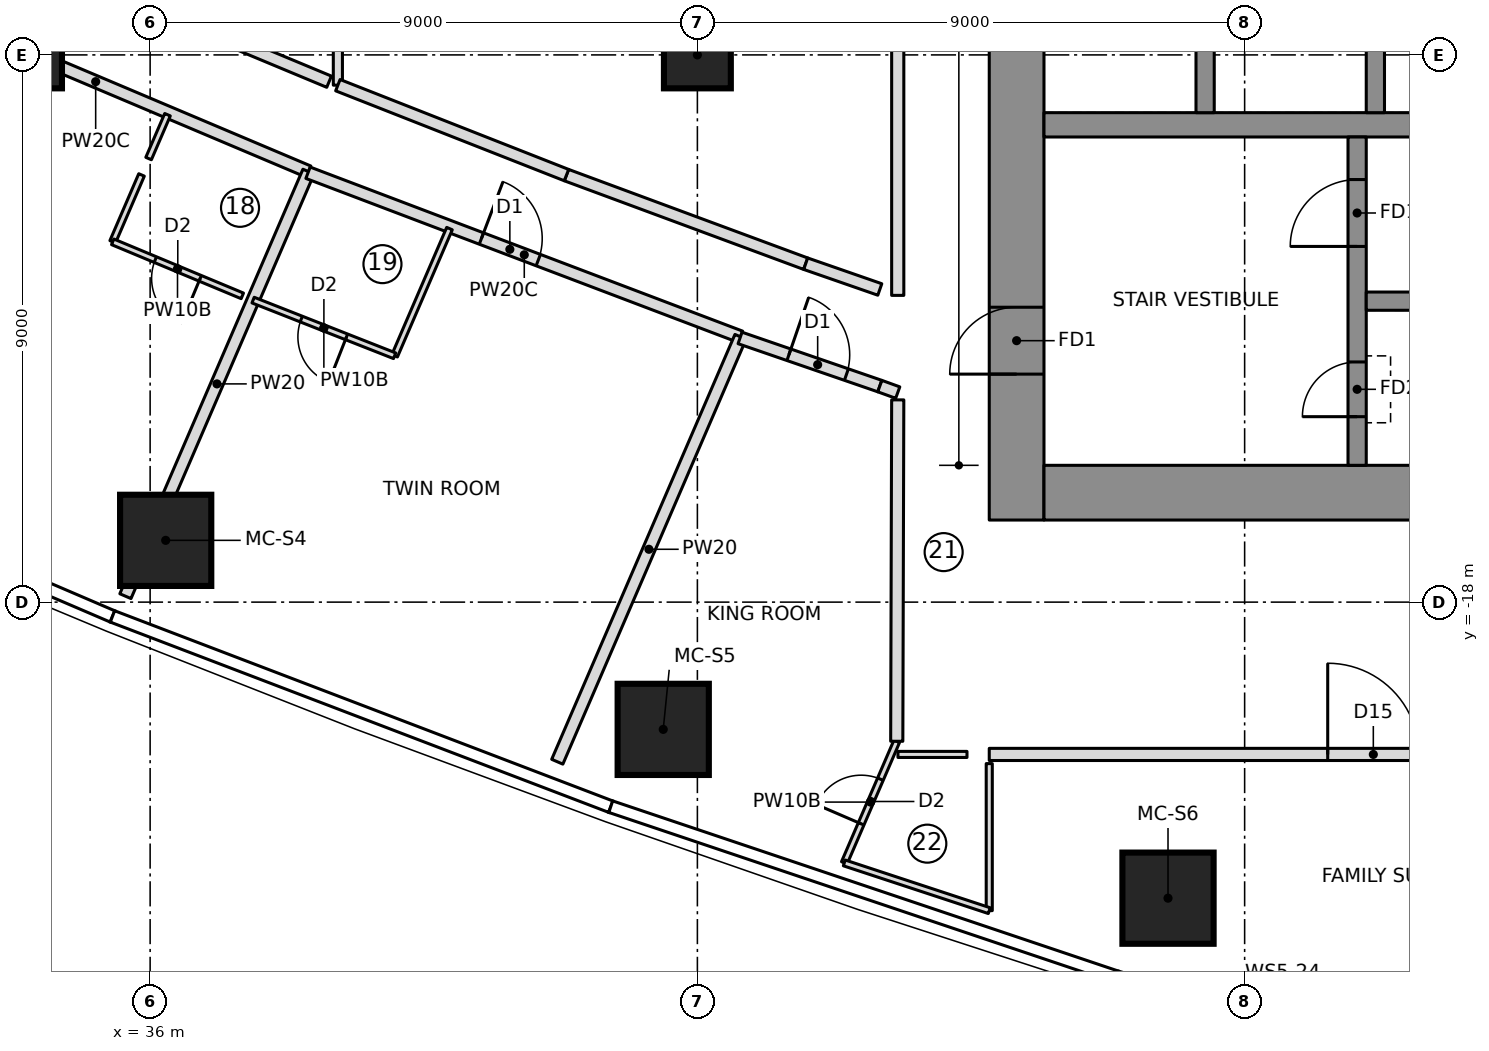
"""IFC4 building model, lengths in metres.
Left out: names, types, materials, properties, quantities, classifications, styles, units other than length and angle.
Written with IfcOpenShell. Run it as: python <this file> out.ifc"""

import sys

from ifc_helpers import new_model, si_unit, direction, frame, frame_2d, origin, origin_2d, place, context, subcontext, project, spatial, polyline, rectangle, outline, extrude, element, fill, save


model = new_model("IFC4")
c1 = context("Model", 3, precision=1e-05, world=origin(), true_north=direction((0.0, 1.0)))
c2 = subcontext(c1, "Body", "Model", "MODEL_VIEW")
j1 = project(units=[si_unit("LENGTHUNIT", "METRE"), si_unit("PLANEANGLEUNIT", "RADIAN")], contexts=[c1])
p1 = place(None, origin())
s1 = spatial("IfcSite", under=j1, at=p1, CompositionType="ELEMENT")
p2 = place(p1, origin())
s2 = spatial("IfcBuilding", under=s1, at=p2, CompositionType="ELEMENT")
p3 = place(p2, frame((0.0, 0.0, 162.15)))
s3 = spatial("IfcBuildingStorey", under=s2, at=p3, CompositionType="ELEMENT", Elevation=162.15)
p4 = place(p3, frame((50.25, -16.65, 0.0), z_axis=(0.0, 0.0, 1.0), x_axis=(0.0, 1.0, 0.0)))
e1 = element("IfcWall", 1, at=p4, inside=s3, PredefinedType="SHEAR", context=c2, shape_type="SweptSolid", body=[
    extrude(rectangle(XDim=10.0, YDim=0.9, at=frame_2d((5.0, 0.0))), origin(), (0.0, 0.0, 1.0), 3.55),
])
p5 = place(p4, frame((2.4, 0.0, 0.0)))
e2 = element("IfcOpeningElement", 2, at=p5, cuts=e1, PredefinedType="OPENING", context=c2, shape_type="SweptSolid", body=[
    extrude(rectangle(XDim=1.1, YDim=2.1, at=frame_2d((0.55, 1.05))), frame((0.0, 0.46, 0.0), z_axis=(0.0, -1.0, 0.0), x_axis=(1.0, 0.0, 0.0)), (0.0, 0.0, 1.0), 0.92),
])
p6 = place(p3, frame((50.7, -16.2, 0.0), z_axis=(0.0, 0.0, 1.0), x_axis=(1.0, 0.0, 0.0)))
e3 = element("IfcWall", 3, at=p6, inside=s3, PredefinedType="SHEAR", context=c2, shape_type="SweptSolid", body=[
    extrude(rectangle(XDim=13.92, YDim=0.9, at=frame_2d((6.96, 0.0))), origin(), (0.0, 0.0, 1.0), 3.55),
])
p7 = place(p3, frame((50.7, -10.15, 0.0), z_axis=(0.0, 0.0, 1.0), x_axis=(1.0, 0.0, 0.0)))
e4 = element("IfcWall", 4, at=p7, inside=s3, PredefinedType="SHEAR", context=c2, shape_type="SweptSolid", body=[
    extrude(rectangle(XDim=13.02, YDim=0.4, at=frame_2d((6.51, 0.0))), origin(), (0.0, 0.0, 1.0), 3.55),
])
for number, where, z_axis, x_axis in (
    (5, (53.35, -9.95, 0.0), (0.0, 0.0, 1.0), (0.0, 1.0, 0.0)),
    (6, (56.15, -9.95, 0.0), (0.0, 0.0, 1.0), (0.0, 1.0, 0.0)),
):
    element("IfcWall", number, at=place(p3, frame(where, z_axis=z_axis, x_axis=x_axis)), inside=s3, PredefinedType="SHEAR", context=c2, shape_type="SweptSolid", body=[
        extrude(rectangle(XDim=3.0, YDim=0.3, at=frame_2d((1.5, 0.0))), origin(), (0.0, 0.0, 1.0), 3.55),
    ])
p8 = place(p3, frame((55.85, -15.75, 0.0), z_axis=(0.0, 0.0, 1.0), x_axis=(0.0, 1.0, 0.0)))
e7 = element("IfcWall", 7, at=p8, inside=s3, PredefinedType="SHEAR", context=c2, shape_type="SweptSolid", body=[
    extrude(rectangle(XDim=5.4, YDim=0.3, at=frame_2d((2.7, 0.0))), origin(), (0.0, 0.0, 1.0), 3.55),
])
p9 = place(p8, frame((3.6, 0.0, 0.0)))
e8 = element("IfcOpeningElement", 8, at=p9, cuts=e7, PredefinedType="OPENING", context=c2, shape_type="SweptSolid", body=[
    extrude(rectangle(XDim=1.1, YDim=2.1, at=frame_2d((0.55, 1.05))), frame((0.0, 0.16, 0.0), z_axis=(0.0, -1.0, 0.0), x_axis=(1.0, 0.0, 0.0)), (0.0, 0.0, 1.0), 0.32),
])
p10 = place(p8, frame((0.8, 0.0, 0.0)))
e9 = element("IfcOpeningElement", 9, at=p10, cuts=e7, PredefinedType="OPENING", context=c2, shape_type="SweptSolid", body=[
    extrude(rectangle(XDim=0.9, YDim=2.1, at=frame_2d((0.45, 1.05))), frame((0.0, 0.16, 0.0), z_axis=(0.0, -1.0, 0.0), x_axis=(1.0, 0.0, 0.0)), (0.0, 0.0, 1.0), 0.32),
])
p11 = place(p3, frame((56.0, -13.05, 0.0), z_axis=(0.0, 0.0, 1.0), x_axis=(1.0, 0.0, 0.0)))
e10 = element("IfcWall", 10, at=p11, inside=s3, PredefinedType="SHEAR", context=c2, shape_type="SweptSolid", body=[
    extrude(rectangle(XDim=7.72, YDim=0.3, at=frame_2d((3.86, 0.0))), origin(), (0.0, 0.0, 1.0), 3.55),
])
for number, where, z_axis, x_axis in (
    (11, (36.256, -16.984, 0.0), (0.0, 0.0, 1.0), (1.0, 0.0, 0.0)),
    (12, (44.438, -20.093, 0.0), (0.0, 0.0, 1.0), (1.0, 0.0, 0.0)),
    (13, (52.74, -22.869, 0.0), (0.0, 0.0, 1.0), (1.0, 0.0, 0.0)),
):
    element("IfcColumn", number, at=place(p3, frame(where, z_axis=z_axis, x_axis=x_axis)), inside=s3, PredefinedType="COLUMN", context=c2, shape_type="SweptSolid", body=[
        extrude(rectangle(XDim=1.5, YDim=1.5, at=origin_2d()), origin(), (0.0, 0.0, 1.0), 3.55),
    ])
for number, where, z_axis, x_axis in (
    (14, (34.0, -9.0, 0.0), (0.0, 0.0, 1.0), (1.0, 0.0, 0.0)),
    (15, (45.0, -9.0, 0.0), (0.0, 0.0, 1.0), (1.0, 0.0, 0.0)),
):
    element("IfcColumn", number, at=place(p3, frame(where, z_axis=z_axis, x_axis=x_axis)), inside=s3, PredefinedType="COLUMN", context=c2, shape_type="SweptSolid", body=[
        extrude(rectangle(XDim=1.1, YDim=1.1, at=origin_2d()), origin(), (0.0, 0.0, 1.0), 3.55),
    ])
p12 = place(p3, frame((51.859, -24.257, 0.0), z_axis=(0.0, 0.0, 1.0), x_axis=(0.956964488344, -0.290205044837, 0.0)))
e16 = element("IfcWall", 16, at=p12, inside=s3, PredefinedType="NOTDEFINED", context=c2, shape_type="SweptSolid", body=[
    extrude(outline(polyline([(0.0, -0.2), (4.418, -0.2), (4.357, 0.2), (0.0, 0.2), (0.0, -0.2)])), origin(), (0.0, 0.0, 1.0), 3.25),
])
p13 = place(p12, frame((0.294, 0.0, 0.9)))
e17 = element("IfcOpeningElement", 17, at=p13, cuts=e16, PredefinedType="OPENING", context=c2, shape_type="SweptSolid", body=[
    extrude(rectangle(XDim=1.2, YDim=1.8, at=frame_2d((0.6, 0.9))), frame((0.0, 0.21, 0.0), z_axis=(0.0, -1.0, 0.0), x_axis=(1.0, 0.0, 0.0)), (0.0, 0.0, 1.0), 0.42),
])
p14 = place(p12, frame((1.694, 0.0, 0.9)))
e18 = element("IfcOpeningElement", 18, at=p14, cuts=e16, PredefinedType="OPENING", context=c2, shape_type="SweptSolid", body=[
    extrude(rectangle(XDim=2.4, YDim=1.8, at=frame_2d((1.2, 0.9))), frame((0.0, 0.21, 0.0), z_axis=(0.0, -1.0, 0.0), x_axis=(1.0, 0.0, 0.0)), (0.0, 0.0, 1.0), 0.42),
])
p15 = place(p3, frame((31.604, -7.96, 0.0), z_axis=(0.0, 0.0, 1.0), x_axis=(0.921069634751, -0.389397904386, 0.0)))
e19 = element("IfcWall", 19, at=p15, inside=s3, PredefinedType="PARTITIONING", context=c2, shape_type="SweptSolid", body=[
    extrude(rectangle(XDim=7.6, YDim=0.2, at=frame_2d((3.8, 0.0))), origin(), (0.0, 0.0, 1.0), 3.15),
])
p16 = place(p15, frame((0.35, 0.0, 0.0)))
e20 = element("IfcOpeningElement", 20, at=p16, cuts=e19, PredefinedType="OPENING", context=c2, shape_type="SweptSolid", body=[
    extrude(rectangle(XDim=1.0, YDim=2.1, at=frame_2d((0.5, 1.05))), frame((0.0, 0.11, 0.0), z_axis=(0.0, -1.0, 0.0), x_axis=(1.0, 0.0, 0.0)), (0.0, 0.0, 1.0), 0.22),
])
p17 = place(p3, frame((35.384, -12.074, 0.0), z_axis=(0.0, 0.0, 1.0), x_axis=(0.396057430794, 0.918225741043, 0.0)))
e21 = element("IfcWall", 21, at=p17, inside=s3, PredefinedType="PARTITIONING", context=c2, shape_type="SweptSolid", body=[
    extrude(rectangle(XDim=1.198, YDim=0.1, at=frame_2d((0.599, 0.0))), origin(), (0.0, 0.0, 1.0), 3.15),
])
p18 = place(p3, frame((35.975, -10.705, 0.0), z_axis=(0.0, 0.0, 1.0), x_axis=(0.396019167007, 0.918242244379, 0.0)))
e22 = element("IfcWall", 22, at=p18, inside=s3, PredefinedType="PARTITIONING", context=c2, shape_type="SweptSolid", body=[
    extrude(rectangle(XDim=0.785, YDim=0.1, at=frame_2d((0.393, 0.0))), origin(), (0.0, 0.0, 1.0), 3.15),
])
p19 = place(p3, frame((37.516, -12.963, 0.0), z_axis=(0.0, 0.0, 1.0), x_axis=(-0.923014363649, 0.384765492863, 0.0)))
e23 = element("IfcWall", 23, at=p19, inside=s3, PredefinedType="PARTITIONING", context=c2, shape_type="SweptSolid", body=[
    extrude(rectangle(XDim=2.31, YDim=0.1, at=frame_2d((1.155, 0.0))), origin(), (0.0, 0.0, 1.0), 3.15),
])
p20 = place(p19, frame((0.75, 0.0, 0.0)))
e24 = element("IfcOpeningElement", 24, at=p20, cuts=e23, PredefinedType="OPENING", context=c2, shape_type="SweptSolid", body=[
    extrude(rectangle(XDim=0.8, YDim=2.1, at=frame_2d((0.4, 1.05))), frame((0.0, 0.06, 0.0), z_axis=(0.0, -1.0, 0.0), x_axis=(1.0, 0.0, 0.0)), (0.0, 0.0, 1.0), 0.12),
])
p21 = place(p3, frame((35.594, -17.902, 0.0), z_axis=(0.0, 0.0, 1.0), x_axis=(0.395975928923, 0.918260890877, 0.0)))
e25 = element("IfcWall", 25, at=p21, inside=s3, PredefinedType="PARTITIONING", context=c2, shape_type="SweptSolid", body=[
    extrude(rectangle(XDim=7.604, YDim=0.2, at=frame_2d((3.802, 0.0))), origin(), (0.0, 0.0, 1.0), 3.15),
])
p22 = place(p3, frame((38.597, -10.938, 0.0), z_axis=(0.0, 0.0, 1.0), x_axis=(0.934963762263, -0.354743235672, 0.0)))
e26 = element("IfcWall", 26, at=p22, inside=s3, PredefinedType="PARTITIONING", context=c2, shape_type="SweptSolid", body=[
    extrude(rectangle(XDim=7.608, YDim=0.2, at=frame_2d((3.804, 0.0))), origin(), (0.0, 0.0, 1.0), 3.15),
])
p23 = place(p22, frame((3.05, 0.0, 0.0)))
e27 = element("IfcOpeningElement", 27, at=p23, cuts=e26, PredefinedType="OPENING", context=c2, shape_type="SweptSolid", body=[
    extrude(rectangle(XDim=1.0, YDim=2.1, at=frame_2d((0.5, 1.05))), frame((0.0, 0.11, 0.0), z_axis=(0.0, -1.0, 0.0), x_axis=(1.0, 0.0, 0.0)), (0.0, 0.0, 1.0), 0.22),
])
p24 = place(p3, frame((40.923, -11.856, 0.0), z_axis=(0.0, 0.0, 1.0), x_axis=(-0.39596178423, -0.918266990275, 0.0)))
e28 = element("IfcWall", 28, at=p24, inside=s3, PredefinedType="PARTITIONING", context=c2, shape_type="SweptSolid", body=[
    extrude(rectangle(XDim=2.278, YDim=0.1, at=frame_2d((1.139, 0.0))), origin(), (0.0, 0.0, 1.0), 3.15),
])
p25 = place(p3, frame((40.021, -13.948, 0.0), z_axis=(0.0, 0.0, 1.0), x_axis=(-0.930568677441, 0.366117380856, 0.0)))
e29 = element("IfcWall", 29, at=p25, inside=s3, PredefinedType="PARTITIONING", context=c2, shape_type="SweptSolid", body=[
    extrude(rectangle(XDim=2.501, YDim=0.1, at=frame_2d((1.25, 0.0))), origin(), (0.0, 0.0, 1.0), 3.15),
])
p26 = place(p25, frame((0.85, 0.0, 0.0)))
e30 = element("IfcOpeningElement", 30, at=p26, cuts=e29, PredefinedType="OPENING", context=c2, shape_type="SweptSolid", body=[
    extrude(rectangle(XDim=0.8, YDim=2.1, at=frame_2d((0.4, 1.05))), frame((0.0, 0.06, 0.0), z_axis=(0.0, -1.0, 0.0), x_axis=(1.0, 0.0, 0.0)), (0.0, 0.0, 1.0), 0.12),
])
p27 = place(p3, frame((42.696, -20.625, 0.0), z_axis=(0.0, 0.0, 1.0), x_axis=(0.395993528256, 0.918253301426, 0.0)))
e31 = element("IfcWall", 31, at=p27, inside=s3, PredefinedType="PARTITIONING", context=c2, shape_type="SweptSolid", body=[
    extrude(rectangle(XDim=7.61, YDim=0.2, at=frame_2d((3.805, 0.0))), origin(), (0.0, 0.0, 1.0), 3.15),
])
p28 = place(p3, frame((47.416, -22.289, 0.0), z_axis=(0.0, 0.0, 1.0), x_axis=(0.396028123143, 0.918238381729, 0.0)))
e32 = element("IfcWall", 32, at=p28, inside=s3, PredefinedType="PARTITIONING", context=c2, shape_type="SweptSolid", body=[
    extrude(rectangle(XDim=2.179, YDim=0.1, at=frame_2d((1.089, 0.0))), origin(), (0.0, 0.0, 1.0), 3.15),
])
p29 = place(p28, frame((0.7, 0.0, 0.0)))
e33 = element("IfcOpeningElement", 33, at=p29, cuts=e32, PredefinedType="OPENING", context=c2, shape_type="SweptSolid", body=[
    extrude(rectangle(XDim=0.8, YDim=2.1, at=frame_2d((0.4, 1.05))), frame((0.0, 0.06, 0.0), z_axis=(0.0, -1.0, 0.0), x_axis=(1.0, 0.0, 0.0)), (0.0, 0.0, 1.0), 0.12),
])
p30 = place(p3, frame((38.943, -9.441, 0.0), z_axis=(0.0, 0.0, 1.0), x_axis=(-0.923013875818, 0.384766663118, 0.0)))
e34 = element("IfcWall", 34, at=p30, inside=s3, PredefinedType="PARTITIONING", context=c2, shape_type="SweptSolid", body=[
    extrude(rectangle(XDim=3.094, YDim=0.2, at=frame_2d((1.547, 0.0))), origin(), (0.0, 0.0, 1.0), 3.15),
])
p31 = place(p3, frame((39.087, -9.498, 0.0), z_axis=(0.0, 0.0, 1.0), x_axis=(0.0, 1.0, 0.0)))
e35 = element("IfcWall", 35, at=p31, inside=s3, PredefinedType="PARTITIONING", context=c2, shape_type="SweptSolid", body=[
    extrude(rectangle(XDim=18.996, YDim=0.15, at=frame_2d((9.498, 0.0))), origin(), (0.0, 0.0, 1.0), 3.15),
])
p32 = place(p3, frame((46.781, -12.434, 0.0), z_axis=(0.0, 0.0, 1.0), x_axis=(-0.937732614305, 0.347357948044, 0.0)))
e36 = element("IfcWall", 36, at=p32, inside=s3, PredefinedType="PARTITIONING", context=c2, shape_type="SweptSolid", body=[
    extrude(rectangle(XDim=4.195, YDim=0.2, at=frame_2d((2.098, 0.0))), origin(), (0.0, 0.0, 1.0), 3.15),
])
p33 = place(p3, frame((42.847, -10.977, 0.0), z_axis=(0.0, 0.0, 1.0), x_axis=(-0.930586875578, 0.366071122873, 0.0)))
e37 = element("IfcWall", 37, at=p33, inside=s3, PredefinedType="PARTITIONING", context=c2, shape_type="SweptSolid", body=[
    extrude(rectangle(XDim=4.04, YDim=0.2, at=frame_2d((2.02, 0.0))), origin(), (0.0, 0.0, 1.0), 3.15),
])
p34 = place(p3, frame((49.8, -20.505, 0.0), z_axis=(0.0, 0.0, 1.0), x_axis=(1.0, 0.0, 0.0)))
e38 = element("IfcWall", 38, at=p34, inside=s3, PredefinedType="PARTITIONING", context=c2, shape_type="SweptSolid", body=[
    extrude(rectangle(XDim=12.133, YDim=0.2, at=frame_2d((6.066, 0.0))), origin(), (0.0, 0.0, 1.0), 3.15),
])
p35 = place(p34, frame((5.566, 0.0, 0.0)))
e39 = element("IfcOpeningElement", 39, at=p35, cuts=e38, PredefinedType="OPENING", context=c2, shape_type="SweptSolid", body=[
    extrude(rectangle(XDim=1.5, YDim=2.1, at=frame_2d((0.75, 1.05))), frame((0.0, 0.11, 0.0), z_axis=(0.0, -1.0, 0.0), x_axis=(1.0, 0.0, 0.0)), (0.0, 0.0, 1.0), 0.22),
])
p36 = place(p3, frame((48.299, -20.505, 0.0), z_axis=(0.0, 0.0, 1.0), x_axis=(1.0, 0.0, 0.0)))
e40 = element("IfcWall", 40, at=p36, inside=s3, PredefinedType="PARTITIONING", context=c2, shape_type="SweptSolid", body=[
    extrude(rectangle(XDim=1.135, YDim=0.1, at=frame_2d((0.568, 0.0))), origin(), (0.0, 0.0, 1.0), 3.15),
])
p37 = place(p3, frame((49.8, -20.656, 0.0), z_axis=(0.0, 0.0, 1.0), x_axis=(0.0, -1.0, 0.0)))
e41 = element("IfcWall", 41, at=p37, inside=s3, PredefinedType="PARTITIONING", context=c2, shape_type="SweptSolid", body=[
    extrude(rectangle(XDim=2.418, YDim=0.1, at=frame_2d((1.209, 0.0))), origin(), (0.0, 0.0, 1.0), 3.15),
])
p38 = place(p3, frame((49.8, -23.074, 0.0), z_axis=(0.0, 0.0, 1.0), x_axis=(-0.949844078437, 0.312723882455, 0.0)))
e42 = element("IfcWall", 42, at=p38, inside=s3, PredefinedType="PARTITIONING", context=c2, shape_type="SweptSolid", body=[
    extrude(rectangle(XDim=2.51, YDim=0.1, at=frame_2d((1.255, 0.0))), origin(), (0.0, 0.0, 1.0), 3.15),
])
p39 = place(p3, frame((45.702, -13.655, 0.0), z_axis=(0.0, 0.0, 1.0), x_axis=(0.945472196346, -0.325702818435, 0.0)))
e43 = element("IfcWall", 43, at=p39, inside=s3, PredefinedType="PARTITIONING", context=c2, shape_type="SweptSolid", body=[
    extrude(rectangle(XDim=2.431, YDim=0.2, at=frame_2d((1.215, 0.0))), origin(), (0.0, 0.0, 1.0), 3.15),
])
p40 = place(p39, frame((0.85, 0.0, 0.0)))
e44 = element("IfcOpeningElement", 44, at=p40, cuts=e43, PredefinedType="OPENING", context=c2, shape_type="SweptSolid", body=[
    extrude(rectangle(XDim=1.0, YDim=2.1, at=frame_2d((0.5, 1.05))), frame((0.0, 0.11, 0.0), z_axis=(0.0, -1.0, 0.0), x_axis=(1.0, 0.0, 0.0)), (0.0, 0.0, 1.0), 0.22),
])
p41 = place(p3, frame((48.0, -12.858, 0.0), z_axis=(0.0, 0.0, 1.0), x_axis=(-0.944517215109, 0.328461916152, 0.0)))
e45 = element("IfcWall", 45, at=p41, inside=s3, PredefinedType="PARTITIONING", context=c2, shape_type="SweptSolid", body=[
    extrude(rectangle(XDim=1.29, YDim=0.2, at=frame_2d((0.645, 0.0))), origin(), (0.0, 0.0, 1.0), 3.15),
])
p42 = place(p3, frame((48.295, 12.955, 0.0), z_axis=(0.0, 0.0, 1.0), x_axis=(0.0, -1.0, 0.0)))
e46 = element("IfcWall", 46, at=p42, inside=s3, PredefinedType="PARTITIONING", context=c2, shape_type="SweptSolid", body=[
    extrude(rectangle(XDim=25.91, YDim=0.2, at=frame_2d((12.955, 0.0))), origin(), (0.0, 0.0, 1.0), 3.15),
])
p43 = place(p3, frame((48.0, -14.447, 0.0), z_axis=(0.0, 0.0, 1.0), x_axis=(0.940111128087, -0.3408681077, 0.0)))
e47 = element("IfcWall", 47, at=p43, inside=s3, PredefinedType="PARTITIONING", context=c2, shape_type="SweptSolid", body=[
    extrude(rectangle(XDim=0.314, YDim=0.2, at=frame_2d((0.157, 0.0))), origin(), (0.0, 0.0, 1.0), 3.15),
])
p44 = place(p3, frame((48.295, -14.674, 0.0), z_axis=(0.0, 0.0, 1.0), x_axis=(-0.00286967817, -0.999995882465, 0.0)))
e48 = element("IfcWall", 48, at=p44, inside=s3, PredefinedType="PARTITIONING", context=c2, shape_type="SweptSolid", body=[
    extrude(rectangle(XDim=5.615, YDim=0.2, at=frame_2d((2.808, 0.0))), origin(), (0.0, 0.0, 1.0), 3.15),
])
p45 = place(p20, origin())
e49 = element("IfcDoor", 49, at=p45, inside=s3, OperationType="SINGLE_SWING_LEFT", PredefinedType="DOOR", context=c2, shape_type="SweptSolid", body=[
    extrude(rectangle(XDim=0.8, YDim=2.1, at=frame_2d((0.4, 1.05))), frame((0.0, 0.025, 0.0), z_axis=(0.0, -1.0, 0.0), x_axis=(1.0, 0.0, 0.0)), (0.0, 0.0, 1.0), 0.05),
])
fill(e24, e49)
p46 = place(p26, origin())
e50 = element("IfcDoor", 50, at=p46, inside=s3, OperationType="SINGLE_SWING_LEFT", PredefinedType="DOOR", context=c2, shape_type="SweptSolid", body=[
    extrude(rectangle(XDim=0.8, YDim=2.1, at=frame_2d((0.4, 1.05))), frame((0.0, 0.025, 0.0), z_axis=(0.0, -1.0, 0.0), x_axis=(1.0, 0.0, 0.0)), (0.0, 0.0, 1.0), 0.05),
])
fill(e30, e50)
p47 = place(p23, origin())
e51 = element("IfcDoor", 51, at=p47, inside=s3, OperationType="SINGLE_SWING_LEFT", PredefinedType="DOOR", context=c2, shape_type="SweptSolid", body=[
    extrude(rectangle(XDim=1.0, YDim=2.1, at=frame_2d((0.5, 1.05))), frame((0.0, 0.025, 0.0), z_axis=(0.0, -1.0, 0.0), x_axis=(1.0, 0.0, 0.0)), (0.0, 0.0, 1.0), 0.05),
])
fill(e27, e51)
p48 = place(p29, origin())
e52 = element("IfcDoor", 52, at=p48, inside=s3, OperationType="SINGLE_SWING_LEFT", PredefinedType="DOOR", context=c2, shape_type="SweptSolid", body=[
    extrude(rectangle(XDim=0.8, YDim=2.1, at=frame_2d((0.4, 1.05))), frame((0.0, 0.025, 0.0), z_axis=(0.0, -1.0, 0.0), x_axis=(1.0, 0.0, 0.0)), (0.0, 0.0, 1.0), 0.05),
])
fill(e33, e52)
p49 = place(p40, origin())
e53 = element("IfcDoor", 53, at=p49, inside=s3, OperationType="SINGLE_SWING_LEFT", PredefinedType="DOOR", context=c2, shape_type="SweptSolid", body=[
    extrude(rectangle(XDim=1.0, YDim=2.1, at=frame_2d((0.5, 1.05))), frame((0.0, 0.025, 0.0), z_axis=(0.0, -1.0, 0.0), x_axis=(1.0, 0.0, 0.0)), (0.0, 0.0, 1.0), 0.05),
])
fill(e44, e53)
p50 = place(p35, origin())
e54 = element("IfcDoor", 54, at=p50, inside=s3, OperationType="DOUBLE_DOOR_SINGLE_SWING", PredefinedType="DOOR", context=c2, shape_type="SweptSolid", body=[
    extrude(rectangle(XDim=1.5, YDim=2.1, at=frame_2d((0.75, 1.05))), frame((0.0, 0.025, 0.0), z_axis=(0.0, -1.0, 0.0), x_axis=(1.0, 0.0, 0.0)), (0.0, 0.0, 1.0), 0.05),
])
fill(e39, e54)
p51 = place(p9, origin())
e55 = element("IfcDoor", 55, at=p51, inside=s3, OperationType="SINGLE_SWING_RIGHT", PredefinedType="DOOR", context=c2, shape_type="SweptSolid", body=[
    extrude(rectangle(XDim=1.1, YDim=2.1, at=frame_2d((0.55, 1.05))), frame((0.0, 0.025, 0.0), z_axis=(0.0, -1.0, 0.0), x_axis=(1.0, 0.0, 0.0)), (0.0, 0.0, 1.0), 0.05),
])
fill(e8, e55)
p52 = place(p5, origin())
e56 = element("IfcDoor", 56, at=p52, inside=s3, OperationType="SINGLE_SWING_RIGHT", PredefinedType="DOOR", context=c2, shape_type="SweptSolid", body=[
    extrude(rectangle(XDim=1.1, YDim=2.1, at=frame_2d((0.55, 1.05))), frame((0.0, 0.025, 0.0), z_axis=(0.0, -1.0, 0.0), x_axis=(1.0, 0.0, 0.0)), (0.0, 0.0, 1.0), 0.05),
])
fill(e2, e56)
p53 = place(p10, origin())
e57 = element("IfcDoor", 57, at=p53, inside=s3, OperationType="SINGLE_SWING_LEFT", PredefinedType="DOOR", context=c2, shape_type="SweptSolid", body=[
    extrude(rectangle(XDim=0.9, YDim=2.1, at=frame_2d((0.45, 1.05))), frame((0.0, 0.025, 0.0), z_axis=(0.0, -1.0, 0.0), x_axis=(1.0, 0.0, 0.0)), (0.0, 0.0, 1.0), 0.05),
])
fill(e9, e57)
save(model, sys.argv[1])
